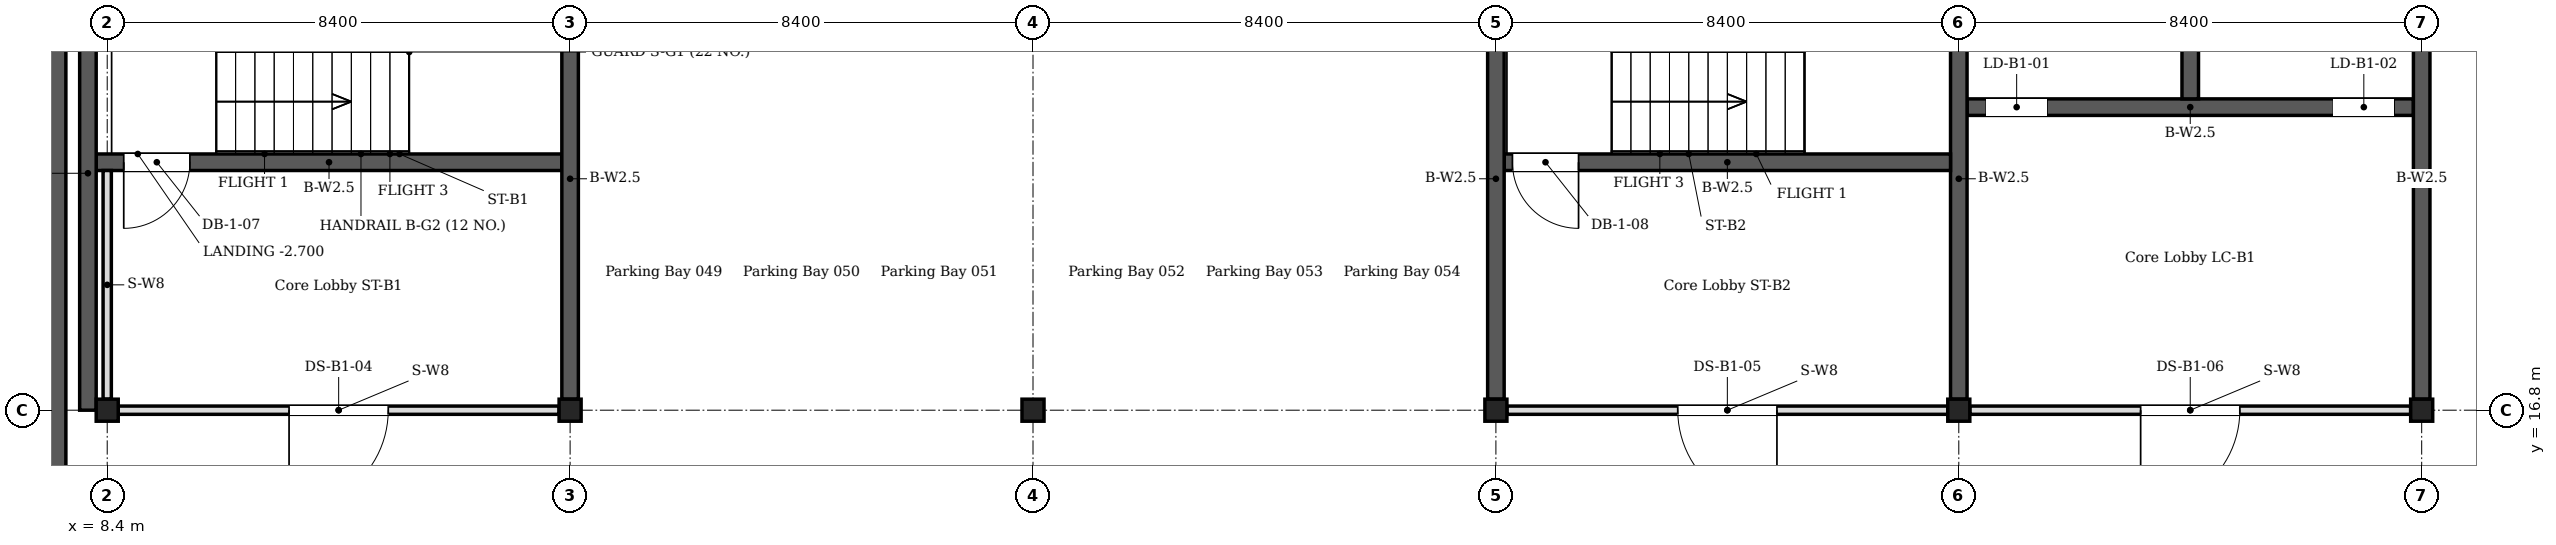
"""IFC4 building model, lengths in metres.
Left out: names, types, materials, properties, quantities, classifications, styles, units other than length and angle.
Written with IfcOpenShell. Run it as: python <this file> out.ifc"""

import sys

from ifc_helpers import new_model, si_unit, direction, frame, frame_2d, origin, origin_2d, place, context, subcontext, project, spatial, rectangle, i_section, extrude, element, fill, save


model = new_model("IFC4")
c1 = context("Model", 3, precision=1e-05, world=origin(), true_north=direction((0.0, 1.0)))
c2 = subcontext(c1, "Body", "Model", "MODEL_VIEW")
j1 = project(units=[si_unit("LENGTHUNIT", "METRE"), si_unit("PLANEANGLEUNIT", "RADIAN")], contexts=[c1])
p1 = place(None, origin())
s1 = spatial("IfcSite", under=j1, at=p1, CompositionType="ELEMENT")
p2 = place(p1, origin())
s2 = spatial("IfcBuilding", under=s1, at=p2, CompositionType="ELEMENT")
p3 = place(p2, frame((0.0, 0.0, -5.4)))
s3 = spatial("IfcBuildingStorey", under=s2, at=p3, CompositionType="ELEMENT", Elevation=-5.4)
p4 = place(p3, frame((7.4, -10.5, -1.2), z_axis=(0.0, 0.0, 1.0), x_axis=(0.0, 1.0, 0.0)))
e1 = element("IfcWall", 1, at=p4, inside=s3, PredefinedType="SOLIDWALL", context=c2, shape_type="SweptSolid", body=[
    extrude(rectangle(XDim=46.5, YDim=0.5, at=frame_2d((23.25, 0.0))), origin(), (0.0, 0.0, 1.0), 6.6),
])
for number, where, z_axis, x_axis in (
    (2, (8.4, 16.8, 0.0), (0.0, 0.0, 1.0), (1.0, 0.0, 0.0)),
    (3, (16.8, 16.8, 0.0), (0.0, 0.0, 1.0), (1.0, 0.0, 0.0)),
    (4, (25.2, 16.8, 0.0), (0.0, 0.0, 1.0), (1.0, 0.0, 0.0)),
    (5, (33.6, 16.8, 0.0), (0.0, 0.0, 1.0), (1.0, 0.0, 0.0)),
    (6, (42.0, 16.8, 0.0), (0.0, 0.0, 1.0), (1.0, 0.0, 0.0)),
    (7, (50.4, 16.8, 0.0), (0.0, 0.0, 1.0), (1.0, 0.0, 0.0)),
):
    element("IfcColumn", number, at=place(p3, frame(where, z_axis=z_axis, x_axis=x_axis)), inside=s3, PredefinedType="COLUMN", context=c2, shape_type="SweptSolid", body=[
        extrude(i_section(OverallWidth=0.4, OverallDepth=0.4, WebThickness=0.013, FlangeThickness=0.021, FilletRadius=0.022, at=origin_2d()), origin(), (0.0, 0.0, 1.0), 5.4),
    ])
for number, where, z_axis, x_axis in (
    (8, (42.0, 17.0, 0.0), (0.0, 0.0, 1.0), (0.0, 1.0, 0.0)),
    (9, (50.4, 17.0, 0.0), (0.0, 0.0, 1.0), (0.0, 1.0, 0.0)),
):
    element("IfcWall", number, at=place(p3, frame(where, z_axis=z_axis, x_axis=x_axis)), inside=s3, PredefinedType="SHEAR", context=c2, shape_type="SweptSolid", body=[
        extrude(rectangle(XDim=8.0, YDim=0.3, at=frame_2d((4.0, 0.0))), origin(), (0.0, 0.0, 1.0), 4.95),
    ])
p5 = place(p3, frame((42.15, 22.3, 0.0), z_axis=(0.0, 0.0, 1.0), x_axis=(1.0, 0.0, 0.0)))
e10 = element("IfcWall", 10, at=p5, inside=s3, PredefinedType="SHEAR", context=c2, shape_type="SweptSolid", body=[
    extrude(rectangle(XDim=8.1, YDim=0.3, at=frame_2d((4.05, 0.0))), origin(), (0.0, 0.0, 1.0), 4.95),
])
p6 = place(p5, frame((0.35, 0.0, 0.0)))
e11 = element("IfcOpeningElement", 11, at=p6, cuts=e10, PredefinedType="OPENING", context=c2, shape_type="SweptSolid", body=[
    extrude(rectangle(XDim=1.1, YDim=2.2, at=frame_2d((0.55, 1.1))), frame((0.0, 0.16, 0.0), z_axis=(0.0, -1.0, 0.0), x_axis=(1.0, 0.0, 0.0)), (0.0, 0.0, 1.0), 0.32),
])
p7 = place(p5, frame((6.65, 0.0, 0.0)))
e12 = element("IfcOpeningElement", 12, at=p7, cuts=e10, PredefinedType="OPENING", context=c2, shape_type="SweptSolid", body=[
    extrude(rectangle(XDim=1.1, YDim=2.2, at=frame_2d((0.55, 1.1))), frame((0.0, 0.16, 0.0), z_axis=(0.0, -1.0, 0.0), x_axis=(1.0, 0.0, 0.0)), (0.0, 0.0, 1.0), 0.32),
])
p8 = place(p3, frame((46.2, 22.45, 0.0), z_axis=(0.0, 0.0, 1.0), x_axis=(0.0, 1.0, 0.0)))
e13 = element("IfcWall", 13, at=p8, inside=s3, PredefinedType="SHEAR", context=c2, shape_type="SweptSolid", body=[
    extrude(rectangle(XDim=2.95, YDim=0.3, at=frame_2d((1.475, 0.0))), origin(), (0.0, 0.0, 1.0), 4.95),
])
p9 = place(p3, frame((8.05, 16.8, 0.0), z_axis=(0.0, 0.0, 1.0), x_axis=(0.0, 1.0, 0.0)))
e14 = element("IfcWall", 14, at=p9, inside=s3, PredefinedType="SHEAR", context=c2, shape_type="SweptSolid", body=[
    extrude(rectangle(XDim=8.6, YDim=0.3, at=frame_2d((4.3, 0.0))), origin(), (0.0, 0.0, 1.0), 4.95),
])
p10 = place(p3, frame((16.8, 17.0, 0.0), z_axis=(0.0, 0.0, 1.0), x_axis=(0.0, 1.0, 0.0)))
e15 = element("IfcWall", 15, at=p10, inside=s3, PredefinedType="SHEAR", context=c2, shape_type="SweptSolid", body=[
    extrude(rectangle(XDim=8.0, YDim=0.3, at=frame_2d((4.0, 0.0))), origin(), (0.0, 0.0, 1.0), 4.95),
])
p11 = place(p3, frame((8.2, 21.3, 0.0), z_axis=(0.0, 0.0, 1.0), x_axis=(1.0, 0.0, 0.0)))
e16 = element("IfcWall", 16, at=p11, inside=s3, PredefinedType="SHEAR", context=c2, shape_type="SweptSolid", body=[
    extrude(rectangle(XDim=8.45, YDim=0.3, at=frame_2d((4.225, 0.0))), origin(), (0.0, 0.0, 1.0), 4.95),
])
p12 = place(p11, frame((0.5, 0.0, 0.0)))
e17 = element("IfcOpeningElement", 17, at=p12, cuts=e16, PredefinedType="OPENING", context=c2, shape_type="SweptSolid", body=[
    extrude(rectangle(XDim=1.2, YDim=2.1, at=frame_2d((0.6, 1.05))), frame((0.0, 0.16, 0.0), z_axis=(0.0, -1.0, 0.0), x_axis=(1.0, 0.0, 0.0)), (0.0, 0.0, 1.0), 0.32),
])
p13 = place(p3, frame((33.6, 17.0, 0.0), z_axis=(0.0, 0.0, 1.0), x_axis=(0.0, 1.0, 0.0)))
e18 = element("IfcWall", 18, at=p13, inside=s3, PredefinedType="SHEAR", context=c2, shape_type="SweptSolid", body=[
    extrude(rectangle(XDim=8.0, YDim=0.3, at=frame_2d((4.0, 0.0))), origin(), (0.0, 0.0, 1.0), 4.95),
])
p14 = place(p3, frame((33.75, 21.3, 0.0), z_axis=(0.0, 0.0, 1.0), x_axis=(1.0, 0.0, 0.0)))
e19 = element("IfcWall", 19, at=p14, inside=s3, PredefinedType="SHEAR", context=c2, shape_type="SweptSolid", body=[
    extrude(rectangle(XDim=8.1, YDim=0.3, at=frame_2d((4.05, 0.0))), origin(), (0.0, 0.0, 1.0), 4.95),
])
p15 = place(p14, frame((0.15, 0.0, 0.0)))
e20 = element("IfcOpeningElement", 20, at=p15, cuts=e19, PredefinedType="OPENING", context=c2, shape_type="SweptSolid", body=[
    extrude(rectangle(XDim=1.2, YDim=2.1, at=frame_2d((0.6, 1.05))), frame((0.0, 0.16, 0.0), z_axis=(0.0, -1.0, 0.0), x_axis=(1.0, 0.0, 0.0)), (0.0, 0.0, 1.0), 0.32),
])
p16 = place(p3, frame((8.6, 16.8, 0.0), z_axis=(0.0, 0.0, 1.0), x_axis=(1.0, 0.0, 0.0)))
e21 = element("IfcWall", 21, at=p16, inside=s3, PredefinedType="PARTITIONING", context=c2, shape_type="SweptSolid", body=[
    extrude(rectangle(XDim=8.0, YDim=0.15, at=frame_2d((4.0, 0.0))), origin(), (0.0, 0.0, 1.0), 4.95),
])
p17 = place(p16, frame((3.1, 0.0, 0.0)))
e22 = element("IfcOpeningElement", 22, at=p17, cuts=e21, PredefinedType="OPENING", context=c2, shape_type="SweptSolid", body=[
    extrude(rectangle(XDim=1.8, YDim=2.1, at=frame_2d((0.9, 1.05))), frame((0.0, 0.085, 0.0), z_axis=(0.0, -1.0, 0.0), x_axis=(1.0, 0.0, 0.0)), (0.0, 0.0, 1.0), 0.17),
])
p18 = place(p3, frame((33.8, 16.8, 0.0), z_axis=(0.0, 0.0, 1.0), x_axis=(1.0, 0.0, 0.0)))
e23 = element("IfcWall", 23, at=p18, inside=s3, PredefinedType="PARTITIONING", context=c2, shape_type="SweptSolid", body=[
    extrude(rectangle(XDim=8.0, YDim=0.15, at=frame_2d((4.0, 0.0))), origin(), (0.0, 0.0, 1.0), 4.95),
])
p19 = place(p18, frame((3.1, 0.0, 0.0)))
e24 = element("IfcOpeningElement", 24, at=p19, cuts=e23, PredefinedType="OPENING", context=c2, shape_type="SweptSolid", body=[
    extrude(rectangle(XDim=1.8, YDim=2.1, at=frame_2d((0.9, 1.05))), frame((0.0, 0.085, 0.0), z_axis=(0.0, -1.0, 0.0), x_axis=(1.0, 0.0, 0.0)), (0.0, 0.0, 1.0), 0.17),
])
p20 = place(p3, frame((42.2, 16.8, 0.0), z_axis=(0.0, 0.0, 1.0), x_axis=(1.0, 0.0, 0.0)))
e25 = element("IfcWall", 25, at=p20, inside=s3, PredefinedType="PARTITIONING", context=c2, shape_type="SweptSolid", body=[
    extrude(rectangle(XDim=8.0, YDim=0.15, at=frame_2d((4.0, 0.0))), origin(), (0.0, 0.0, 1.0), 4.95),
])
p21 = place(p20, frame((3.1, 0.0, 0.0)))
e26 = element("IfcOpeningElement", 26, at=p21, cuts=e25, PredefinedType="OPENING", context=c2, shape_type="SweptSolid", body=[
    extrude(rectangle(XDim=1.8, YDim=2.1, at=frame_2d((0.9, 1.05))), frame((0.0, 0.085, 0.0), z_axis=(0.0, -1.0, 0.0), x_axis=(1.0, 0.0, 0.0)), (0.0, 0.0, 1.0), 0.17),
])
p22 = place(p3, frame((8.4, 17.0, 0.0), z_axis=(0.0, 0.0, 1.0), x_axis=(0.0, 1.0, 0.0)))
e27 = element("IfcWall", 27, at=p22, inside=s3, PredefinedType="PARTITIONING", context=c2, shape_type="SweptSolid", body=[
    extrude(rectangle(XDim=4.15, YDim=0.15, at=frame_2d((2.075, 0.0))), origin(), (0.0, 0.0, 1.0), 4.95),
])
p23 = place(p17, origin())
e28 = element("IfcDoor", 28, at=p23, inside=s3, OperationType="DOUBLE_DOOR_SINGLE_SWING", PredefinedType="DOOR", context=c2, shape_type="SweptSolid", body=[
    extrude(rectangle(XDim=1.8, YDim=2.1, at=frame_2d((0.9, 1.05))), frame((0.0, 0.025, 0.0), z_axis=(0.0, -1.0, 0.0), x_axis=(1.0, 0.0, 0.0)), (0.0, 0.0, 1.0), 0.05),
])
fill(e22, e28)
p24 = place(p19, origin())
e29 = element("IfcDoor", 29, at=p24, inside=s3, OperationType="DOUBLE_DOOR_SINGLE_SWING", PredefinedType="DOOR", context=c2, shape_type="SweptSolid", body=[
    extrude(rectangle(XDim=1.8, YDim=2.1, at=frame_2d((0.9, 1.05))), frame((0.0, 0.025, 0.0), z_axis=(0.0, -1.0, 0.0), x_axis=(1.0, 0.0, 0.0)), (0.0, 0.0, 1.0), 0.05),
])
fill(e24, e29)
p25 = place(p21, origin())
e30 = element("IfcDoor", 30, at=p25, inside=s3, OperationType="DOUBLE_DOOR_SINGLE_SWING", PredefinedType="DOOR", context=c2, shape_type="SweptSolid", body=[
    extrude(rectangle(XDim=1.8, YDim=2.1, at=frame_2d((0.9, 1.05))), frame((0.0, 0.025, 0.0), z_axis=(0.0, -1.0, 0.0), x_axis=(1.0, 0.0, 0.0)), (0.0, 0.0, 1.0), 0.05),
])
fill(e26, e30)
p26 = place(p6, origin())
e31 = element("IfcDoor", 31, at=p26, inside=s3, OperationType="SLIDING_TO_LEFT", PredefinedType="DOOR", context=c2, shape_type="SweptSolid", body=[
    extrude(rectangle(XDim=1.1, YDim=2.2, at=frame_2d((0.55, 1.1))), frame((0.0, 0.025, 0.0), z_axis=(0.0, -1.0, 0.0), x_axis=(1.0, 0.0, 0.0)), (0.0, 0.0, 1.0), 0.05),
])
fill(e11, e31)
p27 = place(p7, origin())
e32 = element("IfcDoor", 32, at=p27, inside=s3, OperationType="SLIDING_TO_LEFT", PredefinedType="DOOR", context=c2, shape_type="SweptSolid", body=[
    extrude(rectangle(XDim=1.1, YDim=2.2, at=frame_2d((0.55, 1.1))), frame((0.0, 0.025, 0.0), z_axis=(0.0, -1.0, 0.0), x_axis=(1.0, 0.0, 0.0)), (0.0, 0.0, 1.0), 0.05),
])
fill(e12, e32)
p28 = place(p12, origin())
e33 = element("IfcDoor", 33, at=p28, inside=s3, OperationType="SINGLE_SWING_LEFT", PredefinedType="DOOR", context=c2, shape_type="SweptSolid", body=[
    extrude(rectangle(XDim=1.2, YDim=2.1, at=frame_2d((0.6, 1.05))), frame((0.0, 0.025, 0.0), z_axis=(0.0, -1.0, 0.0), x_axis=(1.0, 0.0, 0.0)), (0.0, 0.0, 1.0), 0.05),
])
fill(e17, e33)
p29 = place(p15, origin())
e34 = element("IfcDoor", 34, at=p29, inside=s3, OperationType="SINGLE_SWING_LEFT", PredefinedType="DOOR", context=c2, shape_type="SweptSolid", body=[
    extrude(rectangle(XDim=1.2, YDim=2.1, at=frame_2d((0.6, 1.05))), frame((0.0, 0.025, 0.0), z_axis=(0.0, -1.0, 0.0), x_axis=(1.0, 0.0, 0.0)), (0.0, 0.0, 1.0), 0.05),
])
fill(e20, e34)
save(model, sys.argv[1])
